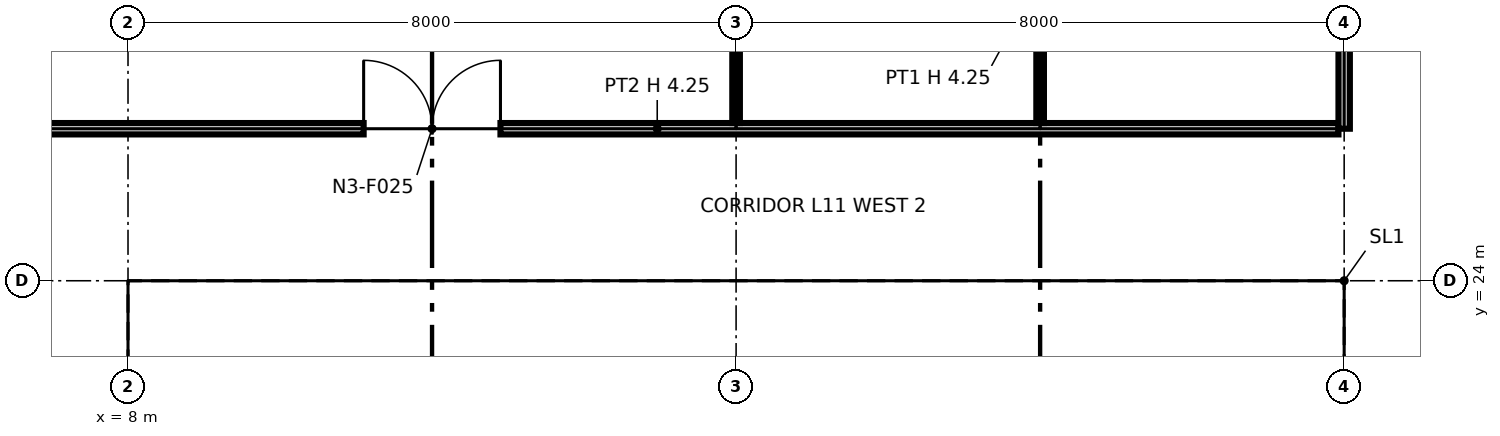
"""IFC4 building model, lengths in metres.
Left out: names, types, materials, properties, quantities, classifications, styles, units other than length and angle.
Written with IfcOpenShell. Run it as: python <this file> out.ifc"""

import sys

from ifc_helpers import new_model, si_unit, direction, frame, frame_2d, origin, origin_2d, place, context, subcontext, project, spatial, polyline, rectangle, i_section, outline, extrude, element, fill, save


model = new_model("IFC4")
c1 = context("Model", 3, precision=1e-05, world=origin(), true_north=direction((0.0, 1.0)))
c2 = subcontext(c1, "Body", "Model", "MODEL_VIEW")
j1 = project(units=[si_unit("LENGTHUNIT", "METRE"), si_unit("PLANEANGLEUNIT", "RADIAN")], contexts=[c1])
p1 = place(None, origin())
s1 = spatial("IfcSite", under=j1, at=p1, CompositionType="ELEMENT")
p2 = place(p1, origin())
s2 = spatial("IfcBuilding", under=s1, at=p2, CompositionType="ELEMENT")
p3 = place(p2, frame((0.0, 0.0, 65.6)))
s3 = spatial("IfcBuildingStorey", under=s2, at=p3, CompositionType="ELEMENT", Elevation=65.6)
for number, where, z_axis, x_axis in (
    (1, (8.0, 24.0, 0.0), (0.0, 0.0, 1.0), (1.0, 0.0, 0.0)),
    (2, (16.0, 24.0, 0.0), (0.0, 0.0, 1.0), (1.0, 0.0, 0.0)),
    (3, (24.0, 24.0, 0.0), (0.0, 0.0, 1.0), (1.0, 0.0, 0.0)),
):
    element("IfcColumn", number, at=place(p3, frame(where, z_axis=z_axis, x_axis=x_axis)), inside=s3, PredefinedType="COLUMN", context=c2, shape_type="SweptSolid", body=[
        extrude(i_section(OverallWidth=0.411, OverallDepth=0.434, WebThickness=0.036, FlangeThickness=0.057, at=origin_2d()), origin(), (0.0, 0.0, 1.0), 4.25),
    ])
p4 = place(p3, frame((8.75, 8.85, 0.0), z_axis=(0.0, 0.0, 1.0), x_axis=(0.0, 1.0, 0.0)))
e4 = element("IfcWall", 4, at=p4, inside=s3, PredefinedType="PARTITIONING", context=c2, shape_type="SweptSolid", body=[
    extrude(outline(polyline([(0.0, 0.0), (14.3, 0.0), (14.3, 4.25), (10.231, 4.25), (10.23, 3.789), (10.07, 3.789), (10.069, 4.25), (7.27, 4.25), (7.269, 3.632), (7.031, 3.632), (7.031, 4.25), (0.0, 4.25), (0.0, 0.0)])), frame((0.0, 0.1, 0.0), z_axis=(0.0, -1.0, 0.0), x_axis=(1.0, 0.0, 0.0)), (0.0, 0.0, 1.0), 0.2),
])
p5 = place(p4, frame((8.3, 0.0, 0.0)))
e5 = element("IfcOpeningElement", 5, at=p5, cuts=e4, PredefinedType="OPENING", context=c2, shape_type="SweptSolid", body=[
    extrude(rectangle(XDim=1.8, YDim=2.1, at=frame_2d((0.9, 1.05))), frame((0.0, 0.11, 0.0), z_axis=(0.0, -1.0, 0.0), x_axis=(1.0, 0.0, 0.0)), (0.0, 0.0, 1.0), 0.22),
])
p6 = place(p3, frame((8.65, 23.25, 0.0), z_axis=(0.0, 0.0, 1.0), x_axis=(1.0, 0.0, 0.0)))
e6 = element("IfcWall", 6, at=p6, inside=s3, PredefinedType="PARTITIONING", context=c2, shape_type="SweptSolid", body=[
    extrude(outline(polyline([(0.0, 0.0), (14.7, 0.0), (14.7, 4.25), (7.469, 4.25), (7.469, 3.632), (7.231, 3.632), (7.23, 4.25), (0.0, 4.25), (0.0, 0.0)])), frame((0.0, 0.1, 0.0), z_axis=(0.0, -1.0, 0.0), x_axis=(1.0, 0.0, 0.0)), (0.0, 0.0, 1.0), 0.2),
])
for number, where, z_axis, x_axis in (
    (7, (11.6, 20.0, 0.0), (0.0, 0.0, 1.0), (0.0, 1.0, 0.0)),
    (8, (14.3, 20.0, 0.0), (0.0, 0.0, 1.0), (0.0, 1.0, 0.0)),
):
    element("IfcWall", number, at=place(p3, frame(where, z_axis=z_axis, x_axis=x_axis)), inside=s3, PredefinedType="PARTITIONING", context=c2, shape_type="SweptSolid", body=[
        extrude(rectangle(XDim=3.15, YDim=0.2, at=frame_2d((1.575, 0.0))), origin(), (0.0, 0.0, 1.0), 4.25),
    ])
for number, where, z_axis, x_axis in (
    (9, (18.075, 20.0, 0.0), (0.0, 0.0, 1.0), (0.0, 1.0, 0.0)),
    (10, (20.425, 20.0, 0.0), (0.0, 0.0, 1.0), (0.0, 1.0, 0.0)),
):
    element("IfcWall", number, at=place(p3, frame(where, z_axis=z_axis, x_axis=x_axis)), inside=s3, PredefinedType="PARTITIONING", context=c2, shape_type="SweptSolid", body=[
        extrude(outline(polyline([(0.0, 0.0), (3.15, 0.0), (3.15, 4.25), (0.082, 4.25), (0.081, 3.789), (0.0, 3.789), (0.0, 0.0)])), frame((0.0, 0.075, 0.0), z_axis=(0.0, -1.0, 0.0), x_axis=(1.0, 0.0, 0.0)), (0.0, 0.0, 1.0), 0.15),
    ])
p7 = place(p3, frame((23.25, 8.85, 0.0), z_axis=(0.0, 0.0, 1.0), x_axis=(0.0, 1.0, 0.0)))
e11 = element("IfcWall", 11, at=p7, inside=s3, PredefinedType="PARTITIONING", context=c2, shape_type="SweptSolid", body=[
    extrude(outline(polyline([(0.0, 0.0), (14.3, 0.0), (14.3, 4.25), (11.231, 4.25), (11.23, 3.789), (11.07, 3.789), (11.069, 4.25), (7.27, 4.25), (7.269, 3.632), (7.031, 3.632), (7.031, 4.25), (1.231, 4.25), (1.23, 3.789), (1.07, 3.789), (1.069, 4.25), (0.0, 4.25), (0.0, 0.0)])), frame((0.0, 0.1, 0.0), z_axis=(0.0, -1.0, 0.0), x_axis=(1.0, 0.0, 0.0)), (0.0, 0.0, 1.0), 0.2),
])
p8 = place(p7, frame((8.3, 0.0, 0.0)))
e12 = element("IfcOpeningElement", 12, at=p8, cuts=e11, PredefinedType="OPENING", context=c2, shape_type="SweptSolid", body=[
    extrude(rectangle(XDim=1.8, YDim=2.1, at=frame_2d((0.9, 1.05))), frame((0.0, 0.11, 0.0), z_axis=(0.0, -1.0, 0.0), x_axis=(1.0, 0.0, 0.0)), (0.0, 0.0, 1.0), 0.22),
])
p9 = place(p3, frame((6.0, 26.0, 0.0), z_axis=(0.0, 0.0, 1.0), x_axis=(1.0, 0.0, 0.0)))
e13 = element("IfcWall", 13, at=p9, inside=s3, PredefinedType="PARTITIONING", context=c2, shape_type="SweptSolid", body=[
    extrude(rectangle(XDim=17.925, YDim=0.15, at=frame_2d((8.962, 0.0))), origin(), (0.0, 0.0, 1.0), 4.25),
])
p10 = place(p9, frame((5.1, 0.0, 0.0)))
e14 = element("IfcOpeningElement", 14, at=p10, cuts=e13, PredefinedType="OPENING", context=c2, shape_type="SweptSolid", body=[
    extrude(rectangle(XDim=1.8, YDim=2.1, at=frame_2d((0.9, 1.05))), frame((0.0, 0.085, 0.0), z_axis=(0.0, -1.0, 0.0), x_axis=(1.0, 0.0, 0.0)), (0.0, 0.0, 1.0), 0.17),
])
p11 = place(p3, frame((16.0, 26.075, 0.0), z_axis=(0.0, 0.0, 1.0), x_axis=(0.0, 1.0, 0.0)))
e15 = element("IfcWall", 15, at=p11, inside=s3, PredefinedType="PARTITIONING", context=c2, shape_type="SweptSolid", body=[
    extrude(rectangle(XDim=3.85, YDim=0.1, at=frame_2d((1.925, 0.0))), origin(), (0.0, 0.0, 1.0), 3.47),
])
p12 = place(p3, frame((20.0, 26.075, 0.0), z_axis=(0.0, 0.0, 1.0), x_axis=(0.0, 1.0, 0.0)))
e16 = element("IfcWall", 16, at=p12, inside=s3, PredefinedType="PARTITIONING", context=c2, shape_type="SweptSolid", body=[
    extrude(outline(polyline([(0.0, 0.0), (3.85, 0.0), (3.85, 4.25), (2.225, 4.25), (2.223, 3.47), (1.627, 3.47), (1.625, 4.25), (0.0, 4.25), (0.0, 0.0)])), frame((0.0, 0.05, 0.0), z_axis=(0.0, -1.0, 0.0), x_axis=(1.0, 0.0, 0.0)), (0.0, 0.0, 1.0), 0.1),
])
p13 = place(p3, frame((24.0, 26.0, 0.0), z_axis=(0.0, 0.0, 1.0), x_axis=(0.0, 1.0, 0.0)))
e17 = element("IfcWall", 17, at=p13, inside=s3, PredefinedType="PARTITIONING", context=c2, shape_type="SweptSolid", body=[
    extrude(rectangle(XDim=5.97, YDim=0.15, at=frame_2d((2.985, 0.0))), origin(), (0.0, 0.0, 1.0), 3.47),
])
p14 = place(p13, frame((2.5, 0.0, 0.0)))
e18 = element("IfcOpeningElement", 18, at=p14, cuts=e17, PredefinedType="OPENING", context=c2, shape_type="SweptSolid", body=[
    extrude(rectangle(XDim=1.0, YDim=2.1, at=frame_2d((0.5, 1.05))), frame((0.0, 0.085, 0.0), z_axis=(0.0, -1.0, 0.0), x_axis=(1.0, 0.0, 0.0)), (0.0, 0.0, 1.0), 0.17),
])
p15 = place(p10, origin())
e19 = element("IfcDoor", 19, at=p15, inside=s3, OperationType="DOUBLE_DOOR_SINGLE_SWING", PredefinedType="DOOR", context=c2, shape_type="SweptSolid", body=[
    extrude(rectangle(XDim=1.8, YDim=2.1, at=frame_2d((0.9, 1.05))), frame((0.0, 0.025, 0.0), z_axis=(0.0, -1.0, 0.0), x_axis=(1.0, 0.0, 0.0)), (0.0, 0.0, 1.0), 0.05),
])
fill(e14, e19)
save(model, sys.argv[1])
